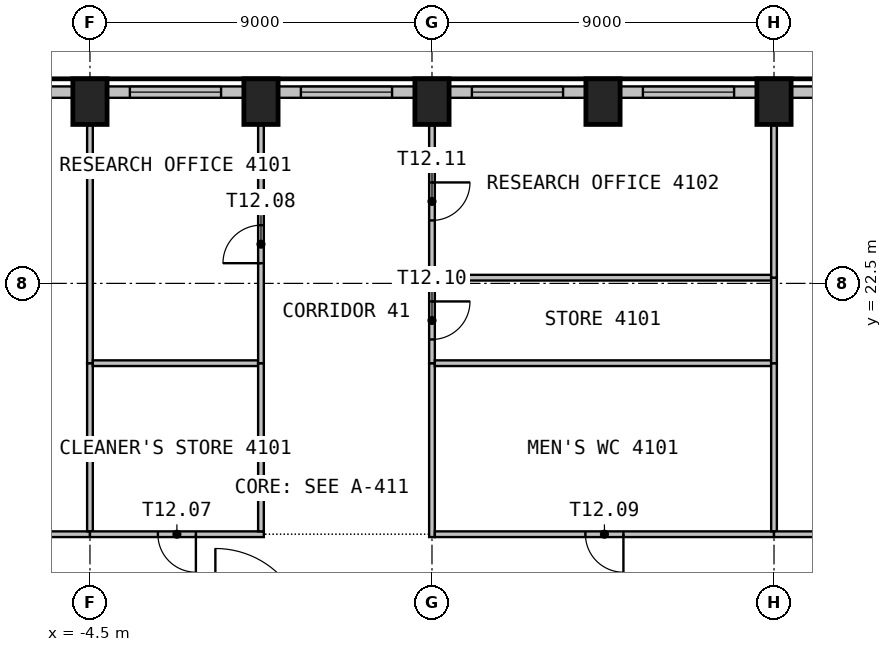
"""IFC4 building model, lengths in metres.
Left out: names, types, materials, properties, quantities, classifications, styles, units other than length and angle.
Written with IfcOpenShell. Run it as: python <this file> out.ifc"""

import sys

from ifc_helpers import new_model, si_unit, direction, frame, frame_2d, origin, origin_2d, place, context, subcontext, project, spatial, rectangle, extrude, element, fill, save


model = new_model("IFC4")
c1 = context("Model", 3, precision=1e-05, world=origin(), true_north=direction((0.0, 1.0)))
c2 = subcontext(c1, "Body", "Model", "MODEL_VIEW")
j1 = project(units=[si_unit("LENGTHUNIT", "METRE"), si_unit("PLANEANGLEUNIT", "RADIAN")], contexts=[c1])
p1 = place(None, origin())
s1 = spatial("IfcSite", under=j1, at=p1, CompositionType="ELEMENT")
p2 = place(p1, origin())
s2 = spatial("IfcBuilding", under=s1, at=p2, CompositionType="ELEMENT")
p3 = place(p2, frame((0.0, 0.0, 167.7)))
s3 = spatial("IfcBuildingStorey", under=s2, at=p3, CompositionType="ELEMENT", Elevation=167.7)
for number, where, z_axis, x_axis in (
    (1, (13.5, 27.283, 0.0), (0.0, 0.0, 1.0), (-1.0, 0.0, 0.0)),
    (2, (9.0, 27.283, 0.0), (0.0, 0.0, 1.0), (-1.0, 0.0, 0.0)),
    (3, (4.5, 27.283, 0.0), (0.0, 0.0, 1.0), (-1.0, 0.0, 0.0)),
    (4, (0.0, 27.283, 0.0), (0.0, 0.0, 1.0), (-1.0, 0.0, 0.0)),
    (5, (-4.5, 27.283, 0.0), (0.0, 0.0, 1.0), (-1.0, 0.0, 0.0)),
):
    element("IfcColumn", number, at=place(p3, frame(where, z_axis=z_axis, x_axis=x_axis)), inside=s3, PredefinedType="COLUMN", context=c2, shape_type="SweptSolid", body=[
        extrude(rectangle(XDim=0.9, YDim=1.2, at=origin_2d()), origin(), (0.0, 0.0, 1.0), 3.575),
    ])
p4 = place(p3, frame((17.245, 27.533, 0.0), z_axis=(0.0, 0.0, 1.0), x_axis=(-1.0, 0.0, 0.0)))
e6 = element("IfcWall", 6, at=p4, inside=s3, PredefinedType="SOLIDWALL", context=c2, shape_type="SweptSolid", body=[
    extrude(rectangle(XDim=3.294, YDim=0.3, at=frame_2d((1.647, 0.0))), origin(), (0.0, 0.0, 1.0), 3.575),
])
p5 = place(p4, frame((0.295, 0.0, 0.9)))
e7 = element("IfcOpeningElement", 7, at=p5, cuts=e6, PredefinedType="OPENING", context=c2, shape_type="SweptSolid", body=[
    extrude(rectangle(XDim=2.4, YDim=2.1, at=frame_2d((1.2, 1.05))), frame((0.0, 0.16, 0.0), z_axis=(0.0, -1.0, 0.0), x_axis=(1.0, 0.0, 0.0)), (0.0, 0.0, 1.0), 0.32),
])
p6 = place(p3, frame((13.05, 27.533, 0.0), z_axis=(0.0, 0.0, 1.0), x_axis=(-1.0, 0.0, 0.0)))
e8 = element("IfcWall", 8, at=p6, inside=s3, PredefinedType="SOLIDWALL", context=c2, shape_type="SweptSolid", body=[
    extrude(rectangle(XDim=3.599, YDim=0.3, at=frame_2d((1.8, 0.0))), origin(), (0.0, 0.0, 1.0), 3.575),
])
p7 = place(p6, frame((0.6, 0.0, 0.9)))
e9 = element("IfcOpeningElement", 9, at=p7, cuts=e8, PredefinedType="OPENING", context=c2, shape_type="SweptSolid", body=[
    extrude(rectangle(XDim=2.4, YDim=2.1, at=frame_2d((1.2, 1.05))), frame((0.0, 0.16, 0.0), z_axis=(0.0, -1.0, 0.0), x_axis=(1.0, 0.0, 0.0)), (0.0, 0.0, 1.0), 0.32),
])
p8 = place(p3, frame((8.55, 27.533, 0.0), z_axis=(0.0, 0.0, 1.0), x_axis=(-1.0, 0.0, 0.0)))
e10 = element("IfcWall", 10, at=p8, inside=s3, PredefinedType="SOLIDWALL", context=c2, shape_type="SweptSolid", body=[
    extrude(rectangle(XDim=3.599, YDim=0.3, at=frame_2d((1.8, 0.0))), origin(), (0.0, 0.0, 1.0), 3.575),
])
p9 = place(p8, frame((0.6, 0.0, 0.9)))
e11 = element("IfcOpeningElement", 11, at=p9, cuts=e10, PredefinedType="OPENING", context=c2, shape_type="SweptSolid", body=[
    extrude(rectangle(XDim=2.4, YDim=2.1, at=frame_2d((1.2, 1.05))), frame((0.0, 0.16, 0.0), z_axis=(0.0, -1.0, 0.0), x_axis=(1.0, 0.0, 0.0)), (0.0, 0.0, 1.0), 0.32),
])
p10 = place(p3, frame((4.05, 27.533, 0.0), z_axis=(0.0, 0.0, 1.0), x_axis=(-1.0, 0.0, 0.0)))
e12 = element("IfcWall", 12, at=p10, inside=s3, PredefinedType="SOLIDWALL", context=c2, shape_type="SweptSolid", body=[
    extrude(rectangle(XDim=3.599, YDim=0.3, at=frame_2d((1.8, 0.0))), origin(), (0.0, 0.0, 1.0), 3.575),
])
p11 = place(p10, frame((0.6, 0.0, 0.9)))
e13 = element("IfcOpeningElement", 13, at=p11, cuts=e12, PredefinedType="OPENING", context=c2, shape_type="SweptSolid", body=[
    extrude(rectangle(XDim=2.4, YDim=2.1, at=frame_2d((1.2, 1.05))), frame((0.0, 0.16, 0.0), z_axis=(0.0, -1.0, 0.0), x_axis=(1.0, 0.0, 0.0)), (0.0, 0.0, 1.0), 0.32),
])
p12 = place(p3, frame((-0.45, 27.533, 0.0), z_axis=(0.0, 0.0, 1.0), x_axis=(-1.0, 0.0, 0.0)))
e14 = element("IfcWall", 14, at=p12, inside=s3, PredefinedType="SOLIDWALL", context=c2, shape_type="SweptSolid", body=[
    extrude(rectangle(XDim=3.599, YDim=0.3, at=frame_2d((1.8, 0.0))), origin(), (0.0, 0.0, 1.0), 3.575),
])
p13 = place(p12, frame((0.6, 0.0, 0.9)))
e15 = element("IfcOpeningElement", 15, at=p13, cuts=e14, PredefinedType="OPENING", context=c2, shape_type="SweptSolid", body=[
    extrude(rectangle(XDim=2.4, YDim=2.1, at=frame_2d((1.2, 1.05))), frame((0.0, 0.16, 0.0), z_axis=(0.0, -1.0, 0.0), x_axis=(1.0, 0.0, 0.0)), (0.0, 0.0, 1.0), 0.32),
])
p14 = place(p3, frame((-4.95, 27.533, 0.0), z_axis=(0.0, 0.0, 1.0), x_axis=(-1.0, 0.0, 0.0)))
e16 = element("IfcWall", 16, at=p14, inside=s3, PredefinedType="SOLIDWALL", context=c2, shape_type="SweptSolid", body=[
    extrude(rectangle(XDim=3.599, YDim=0.3, at=frame_2d((1.8, 0.0))), origin(), (0.0, 0.0, 1.0), 3.575),
])
p15 = place(p14, frame((0.6, 0.0, 0.9)))
e17 = element("IfcOpeningElement", 17, at=p15, cuts=e16, PredefinedType="OPENING", context=c2, shape_type="SweptSolid", body=[
    extrude(rectangle(XDim=2.4, YDim=2.1, at=frame_2d((1.2, 1.05))), frame((0.0, 0.16, 0.0), z_axis=(0.0, -1.0, 0.0), x_axis=(1.0, 0.0, 0.0)), (0.0, 0.0, 1.0), 0.32),
])
p16 = place(p3, frame((-4.5, 15.9, 0.0), z_axis=(0.0, 0.0, 1.0), x_axis=(-1.0, 0.0, 0.0)))
e18 = element("IfcWall", 18, at=p16, inside=s3, PredefinedType="PARTITIONING", context=c2, shape_type="SweptSolid", body=[
    extrude(rectangle(XDim=10.289, YDim=0.15, at=frame_2d((5.145, 0.0))), origin(), (0.0, 0.0, 1.0), 3.575),
])
p17 = place(p16, frame((4.645, 0.0, 0.0)))
e19 = element("IfcOpeningElement", 19, at=p17, cuts=e18, PredefinedType="OPENING", context=c2, shape_type="SweptSolid", body=[
    extrude(rectangle(XDim=1.0, YDim=2.1, at=frame_2d((0.5, 1.05))), frame((0.0, 0.085, 0.0), z_axis=(0.0, -1.0, 0.0), x_axis=(1.0, 0.0, 0.0)), (0.0, 0.0, 1.0), 0.17),
])
p18 = place(p3, frame((-4.5, 20.4, 0.0), z_axis=(0.0, 0.0, 1.0), x_axis=(0.0, -1.0, 0.0)))
e20 = element("IfcWall", 20, at=p18, inside=s3, PredefinedType="PARTITIONING", context=c2, shape_type="SweptSolid", body=[
    extrude(rectangle(XDim=4.425, YDim=0.15, at=frame_2d((2.212, 0.0))), origin(), (0.0, 0.0, 1.0), 3.575),
])
p19 = place(p3, frame((0.075, 15.9, 0.0), z_axis=(0.0, 0.0, 1.0), x_axis=(-1.0, 0.0, 0.0)))
e21 = element("IfcWall", 21, at=p19, inside=s3, PredefinedType="PARTITIONING", context=c2, shape_type="SweptSolid", body=[
    extrude(rectangle(XDim=4.575, YDim=0.15, at=frame_2d((2.288, 0.0))), origin(), (0.0, 0.0, 1.0), 3.575),
])
p20 = place(p19, frame((1.788, 0.0, 0.0)))
e22 = element("IfcOpeningElement", 22, at=p20, cuts=e21, PredefinedType="OPENING", context=c2, shape_type="SweptSolid", body=[
    extrude(rectangle(XDim=1.0, YDim=2.1, at=frame_2d((0.5, 1.05))), frame((0.0, 0.085, 0.0), z_axis=(0.0, -1.0, 0.0), x_axis=(1.0, 0.0, 0.0)), (0.0, 0.0, 1.0), 0.17),
])
p21 = place(p3, frame((-4.5, 26.663, 0.0), z_axis=(0.0, 0.0, 1.0), x_axis=(0.0, -1.0, 0.0)))
e23 = element("IfcWall", 23, at=p21, inside=s3, PredefinedType="PARTITIONING", context=c2, shape_type="SweptSolid", body=[
    extrude(rectangle(XDim=6.263, YDim=0.15, at=frame_2d((3.131, 0.0))), origin(), (0.0, 0.0, 1.0), 3.575),
])
p22 = place(p3, frame((-4.425, 20.4, 0.0), z_axis=(0.0, 0.0, 1.0), x_axis=(1.0, 0.0, 0.0)))
e24 = element("IfcWall", 24, at=p22, inside=s3, PredefinedType="PARTITIONING", context=c2, shape_type="SweptSolid", body=[
    extrude(rectangle(XDim=4.35, YDim=0.15, at=frame_2d((2.175, 0.0))), origin(), (0.0, 0.0, 1.0), 3.575),
])
p23 = place(p3, frame((0.0, 15.975, 0.0), z_axis=(0.0, 0.0, 1.0), x_axis=(0.0, 1.0, 0.0)))
e25 = element("IfcWall", 25, at=p23, inside=s3, PredefinedType="PARTITIONING", context=c2, shape_type="SweptSolid", body=[
    extrude(rectangle(XDim=4.425, YDim=0.15, at=frame_2d((2.212, 0.0))), origin(), (0.0, 0.0, 1.0), 3.575),
])
p24 = place(p3, frame((0.0, 20.4, 0.0), z_axis=(0.0, 0.0, 1.0), x_axis=(0.0, 1.0, 0.0)))
e26 = element("IfcWall", 26, at=p24, inside=s3, PredefinedType="PARTITIONING", context=c2, shape_type="SweptSolid", body=[
    extrude(rectangle(XDim=6.263, YDim=0.15, at=frame_2d((3.131, 0.0))), origin(), (0.0, 0.0, 1.0), 3.575),
])
p25 = place(p24, frame((2.631, 0.0, 0.0)))
e27 = element("IfcOpeningElement", 27, at=p25, cuts=e26, PredefinedType="OPENING", context=c2, shape_type="SweptSolid", body=[
    extrude(rectangle(XDim=1.0, YDim=2.1, at=frame_2d((0.5, 1.05))), frame((0.0, 0.085, 0.0), z_axis=(0.0, -1.0, 0.0), x_axis=(1.0, 0.0, 0.0)), (0.0, 0.0, 1.0), 0.17),
])
p26 = place(p3, frame((4.5, 20.4, 0.0), z_axis=(0.0, 0.0, 1.0), x_axis=(0.0, -1.0, 0.0)))
e28 = element("IfcWall", 28, at=p26, inside=s3, PredefinedType="PARTITIONING", context=c2, shape_type="SweptSolid", body=[
    extrude(rectangle(XDim=4.575, YDim=0.15, at=frame_2d((2.288, 0.0))), origin(), (0.0, 0.0, 1.0), 3.575),
])
p27 = place(p3, frame((13.5, 15.9, 0.0), z_axis=(0.0, 0.0, 1.0), x_axis=(-1.0, 0.0, 0.0)))
e29 = element("IfcWall", 29, at=p27, inside=s3, PredefinedType="PARTITIONING", context=c2, shape_type="SweptSolid", body=[
    extrude(rectangle(XDim=8.925, YDim=0.15, at=frame_2d((4.462, 0.0))), origin(), (0.0, 0.0, 1.0), 3.575),
])
p28 = place(p27, frame((3.962, 0.0, 0.0)))
e30 = element("IfcOpeningElement", 30, at=p28, cuts=e29, PredefinedType="OPENING", context=c2, shape_type="SweptSolid", body=[
    extrude(rectangle(XDim=1.0, YDim=2.1, at=frame_2d((0.5, 1.05))), frame((0.0, 0.085, 0.0), z_axis=(0.0, -1.0, 0.0), x_axis=(1.0, 0.0, 0.0)), (0.0, 0.0, 1.0), 0.17),
])
p29 = place(p3, frame((4.5, 22.65, 0.0), z_axis=(0.0, 0.0, 1.0), x_axis=(0.0, -1.0, 0.0)))
e31 = element("IfcWall", 31, at=p29, inside=s3, PredefinedType="PARTITIONING", context=c2, shape_type="SweptSolid", body=[
    extrude(rectangle(XDim=2.25, YDim=0.15, at=frame_2d((1.125, 0.0))), origin(), (0.0, 0.0, 1.0), 3.575),
])
p30 = place(p29, frame((0.625, 0.0, 0.0)))
e32 = element("IfcOpeningElement", 32, at=p30, cuts=e31, PredefinedType="OPENING", context=c2, shape_type="SweptSolid", body=[
    extrude(rectangle(XDim=1.0, YDim=2.1, at=frame_2d((0.5, 1.05))), frame((0.0, 0.085, 0.0), z_axis=(0.0, -1.0, 0.0), x_axis=(1.0, 0.0, 0.0)), (0.0, 0.0, 1.0), 0.17),
])
p31 = place(p3, frame((4.575, 20.4, 0.0), z_axis=(0.0, 0.0, 1.0), x_axis=(1.0, 0.0, 0.0)))
e33 = element("IfcWall", 33, at=p31, inside=s3, PredefinedType="PARTITIONING", context=c2, shape_type="SweptSolid", body=[
    extrude(rectangle(XDim=8.85, YDim=0.15, at=frame_2d((4.425, 0.0))), origin(), (0.0, 0.0, 1.0), 3.575),
])
p32 = place(p3, frame((4.5, 26.663, 0.0), z_axis=(0.0, 0.0, 1.0), x_axis=(0.0, -1.0, 0.0)))
e34 = element("IfcWall", 34, at=p32, inside=s3, PredefinedType="PARTITIONING", context=c2, shape_type="SweptSolid", body=[
    extrude(rectangle(XDim=4.013, YDim=0.15, at=frame_2d((2.006, 0.0))), origin(), (0.0, 0.0, 1.0), 3.575),
])
p33 = place(p32, frame((1.506, 0.0, 0.0)))
e35 = element("IfcOpeningElement", 35, at=p33, cuts=e34, PredefinedType="OPENING", context=c2, shape_type="SweptSolid", body=[
    extrude(rectangle(XDim=1.0, YDim=2.1, at=frame_2d((0.5, 1.05))), frame((0.0, 0.085, 0.0), z_axis=(0.0, -1.0, 0.0), x_axis=(1.0, 0.0, 0.0)), (0.0, 0.0, 1.0), 0.17),
])
p34 = place(p3, frame((4.575, 22.65, 0.0), z_axis=(0.0, 0.0, 1.0), x_axis=(1.0, 0.0, 0.0)))
e36 = element("IfcWall", 36, at=p34, inside=s3, PredefinedType="PARTITIONING", context=c2, shape_type="SweptSolid", body=[
    extrude(rectangle(XDim=8.85, YDim=0.15, at=frame_2d((4.425, 0.0))), origin(), (0.0, 0.0, 1.0), 3.575),
])
p35 = place(p3, frame((13.5, 20.4, 0.0), z_axis=(0.0, 0.0, 1.0), x_axis=(0.0, -1.0, 0.0)))
e37 = element("IfcWall", 37, at=p35, inside=s3, PredefinedType="PARTITIONING", context=c2, shape_type="SweptSolid", body=[
    extrude(rectangle(XDim=4.425, YDim=0.15, at=frame_2d((2.212, 0.0))), origin(), (0.0, 0.0, 1.0), 3.575),
])
p36 = place(p3, frame((18.225, 15.9, 0.0), z_axis=(0.0, 0.0, 1.0), x_axis=(-1.0, 0.0, 0.0)))
e38 = element("IfcWall", 38, at=p36, inside=s3, PredefinedType="PARTITIONING", context=c2, shape_type="SweptSolid", body=[
    extrude(rectangle(XDim=4.725, YDim=0.15, at=frame_2d((2.363, 0.0))), origin(), (0.0, 0.0, 1.0), 3.575),
])
p37 = place(p3, frame((13.5, 22.65, 0.0), z_axis=(0.0, 0.0, 1.0), x_axis=(0.0, -1.0, 0.0)))
e39 = element("IfcWall", 39, at=p37, inside=s3, PredefinedType="PARTITIONING", context=c2, shape_type="SweptSolid", body=[
    extrude(rectangle(XDim=2.25, YDim=0.15, at=frame_2d((1.125, 0.0))), origin(), (0.0, 0.0, 1.0), 3.575),
])
p38 = place(p3, frame((13.5, 26.663, 0.0), z_axis=(0.0, 0.0, 1.0), x_axis=(0.0, -1.0, 0.0)))
e40 = element("IfcWall", 40, at=p38, inside=s3, PredefinedType="PARTITIONING", context=c2, shape_type="SweptSolid", body=[
    extrude(rectangle(XDim=4.013, YDim=0.15, at=frame_2d((2.006, 0.0))), origin(), (0.0, 0.0, 1.0), 3.575),
])
p39 = place(p7, origin())
e41 = element("IfcWindow", 41, at=p39, inside=s3, PartitioningType="SINGLE_PANEL", PredefinedType="WINDOW", context=c2, shape_type="SweptSolid", body=[
    extrude(rectangle(XDim=2.4, YDim=2.1, at=frame_2d((1.2, 1.05))), frame((0.0, 0.03, 0.0), z_axis=(0.0, -1.0, 0.0), x_axis=(1.0, 0.0, 0.0)), (0.0, 0.0, 1.0), 0.06),
])
fill(e9, e41)
p40 = place(p9, origin())
e42 = element("IfcWindow", 42, at=p40, inside=s3, PartitioningType="SINGLE_PANEL", PredefinedType="WINDOW", context=c2, shape_type="SweptSolid", body=[
    extrude(rectangle(XDim=2.4, YDim=2.1, at=frame_2d((1.2, 1.05))), frame((0.0, 0.03, 0.0), z_axis=(0.0, -1.0, 0.0), x_axis=(1.0, 0.0, 0.0)), (0.0, 0.0, 1.0), 0.06),
])
fill(e11, e42)
p41 = place(p11, origin())
e43 = element("IfcWindow", 43, at=p41, inside=s3, PartitioningType="SINGLE_PANEL", PredefinedType="WINDOW", context=c2, shape_type="SweptSolid", body=[
    extrude(rectangle(XDim=2.4, YDim=2.1, at=frame_2d((1.2, 1.05))), frame((0.0, 0.03, 0.0), z_axis=(0.0, -1.0, 0.0), x_axis=(1.0, 0.0, 0.0)), (0.0, 0.0, 1.0), 0.06),
])
fill(e13, e43)
p42 = place(p13, origin())
e44 = element("IfcWindow", 44, at=p42, inside=s3, PartitioningType="SINGLE_PANEL", PredefinedType="WINDOW", context=c2, shape_type="SweptSolid", body=[
    extrude(rectangle(XDim=2.4, YDim=2.1, at=frame_2d((1.2, 1.05))), frame((0.0, 0.03, 0.0), z_axis=(0.0, -1.0, 0.0), x_axis=(1.0, 0.0, 0.0)), (0.0, 0.0, 1.0), 0.06),
])
fill(e15, e44)
p43 = place(p20, origin())
e45 = element("IfcDoor", 45, at=p43, inside=s3, OperationType="SINGLE_SWING_RIGHT", PredefinedType="DOOR", context=c2, shape_type="SweptSolid", body=[
    extrude(rectangle(XDim=1.0, YDim=2.1, at=frame_2d((0.5, 1.05))), frame((0.0, 0.025, 0.0), z_axis=(0.0, -1.0, 0.0), x_axis=(1.0, 0.0, 0.0)), (0.0, 0.0, 1.0), 0.05),
])
fill(e22, e45)
p44 = place(p25, origin())
e46 = element("IfcDoor", 46, at=p44, inside=s3, OperationType="SINGLE_SWING_RIGHT", PredefinedType="DOOR", context=c2, shape_type="SweptSolid", body=[
    extrude(rectangle(XDim=1.0, YDim=2.1, at=frame_2d((0.5, 1.05))), frame((0.0, 0.025, 0.0), z_axis=(0.0, -1.0, 0.0), x_axis=(1.0, 0.0, 0.0)), (0.0, 0.0, 1.0), 0.05),
])
fill(e27, e46)
p45 = place(p28, origin())
e47 = element("IfcDoor", 47, at=p45, inside=s3, OperationType="SINGLE_SWING_LEFT", PredefinedType="DOOR", context=c2, shape_type="SweptSolid", body=[
    extrude(rectangle(XDim=1.0, YDim=2.1, at=frame_2d((0.5, 1.05))), frame((0.0, 0.025, 0.0), z_axis=(0.0, -1.0, 0.0), x_axis=(1.0, 0.0, 0.0)), (0.0, 0.0, 1.0), 0.05),
])
fill(e30, e47)
p46 = place(p30, origin())
e48 = element("IfcDoor", 48, at=p46, inside=s3, OperationType="SINGLE_SWING_RIGHT", PredefinedType="DOOR", context=c2, shape_type="SweptSolid", body=[
    extrude(rectangle(XDim=1.0, YDim=2.1, at=frame_2d((0.5, 1.05))), frame((0.0, 0.025, 0.0), z_axis=(0.0, -1.0, 0.0), x_axis=(1.0, 0.0, 0.0)), (0.0, 0.0, 1.0), 0.05),
])
fill(e32, e48)
p47 = place(p33, origin())
e49 = element("IfcDoor", 49, at=p47, inside=s3, OperationType="SINGLE_SWING_LEFT", PredefinedType="DOOR", context=c2, shape_type="SweptSolid", body=[
    extrude(rectangle(XDim=1.0, YDim=2.1, at=frame_2d((0.5, 1.05))), frame((0.0, 0.025, 0.0), z_axis=(0.0, -1.0, 0.0), x_axis=(1.0, 0.0, 0.0)), (0.0, 0.0, 1.0), 0.05),
])
fill(e35, e49)
save(model, sys.argv[1])
